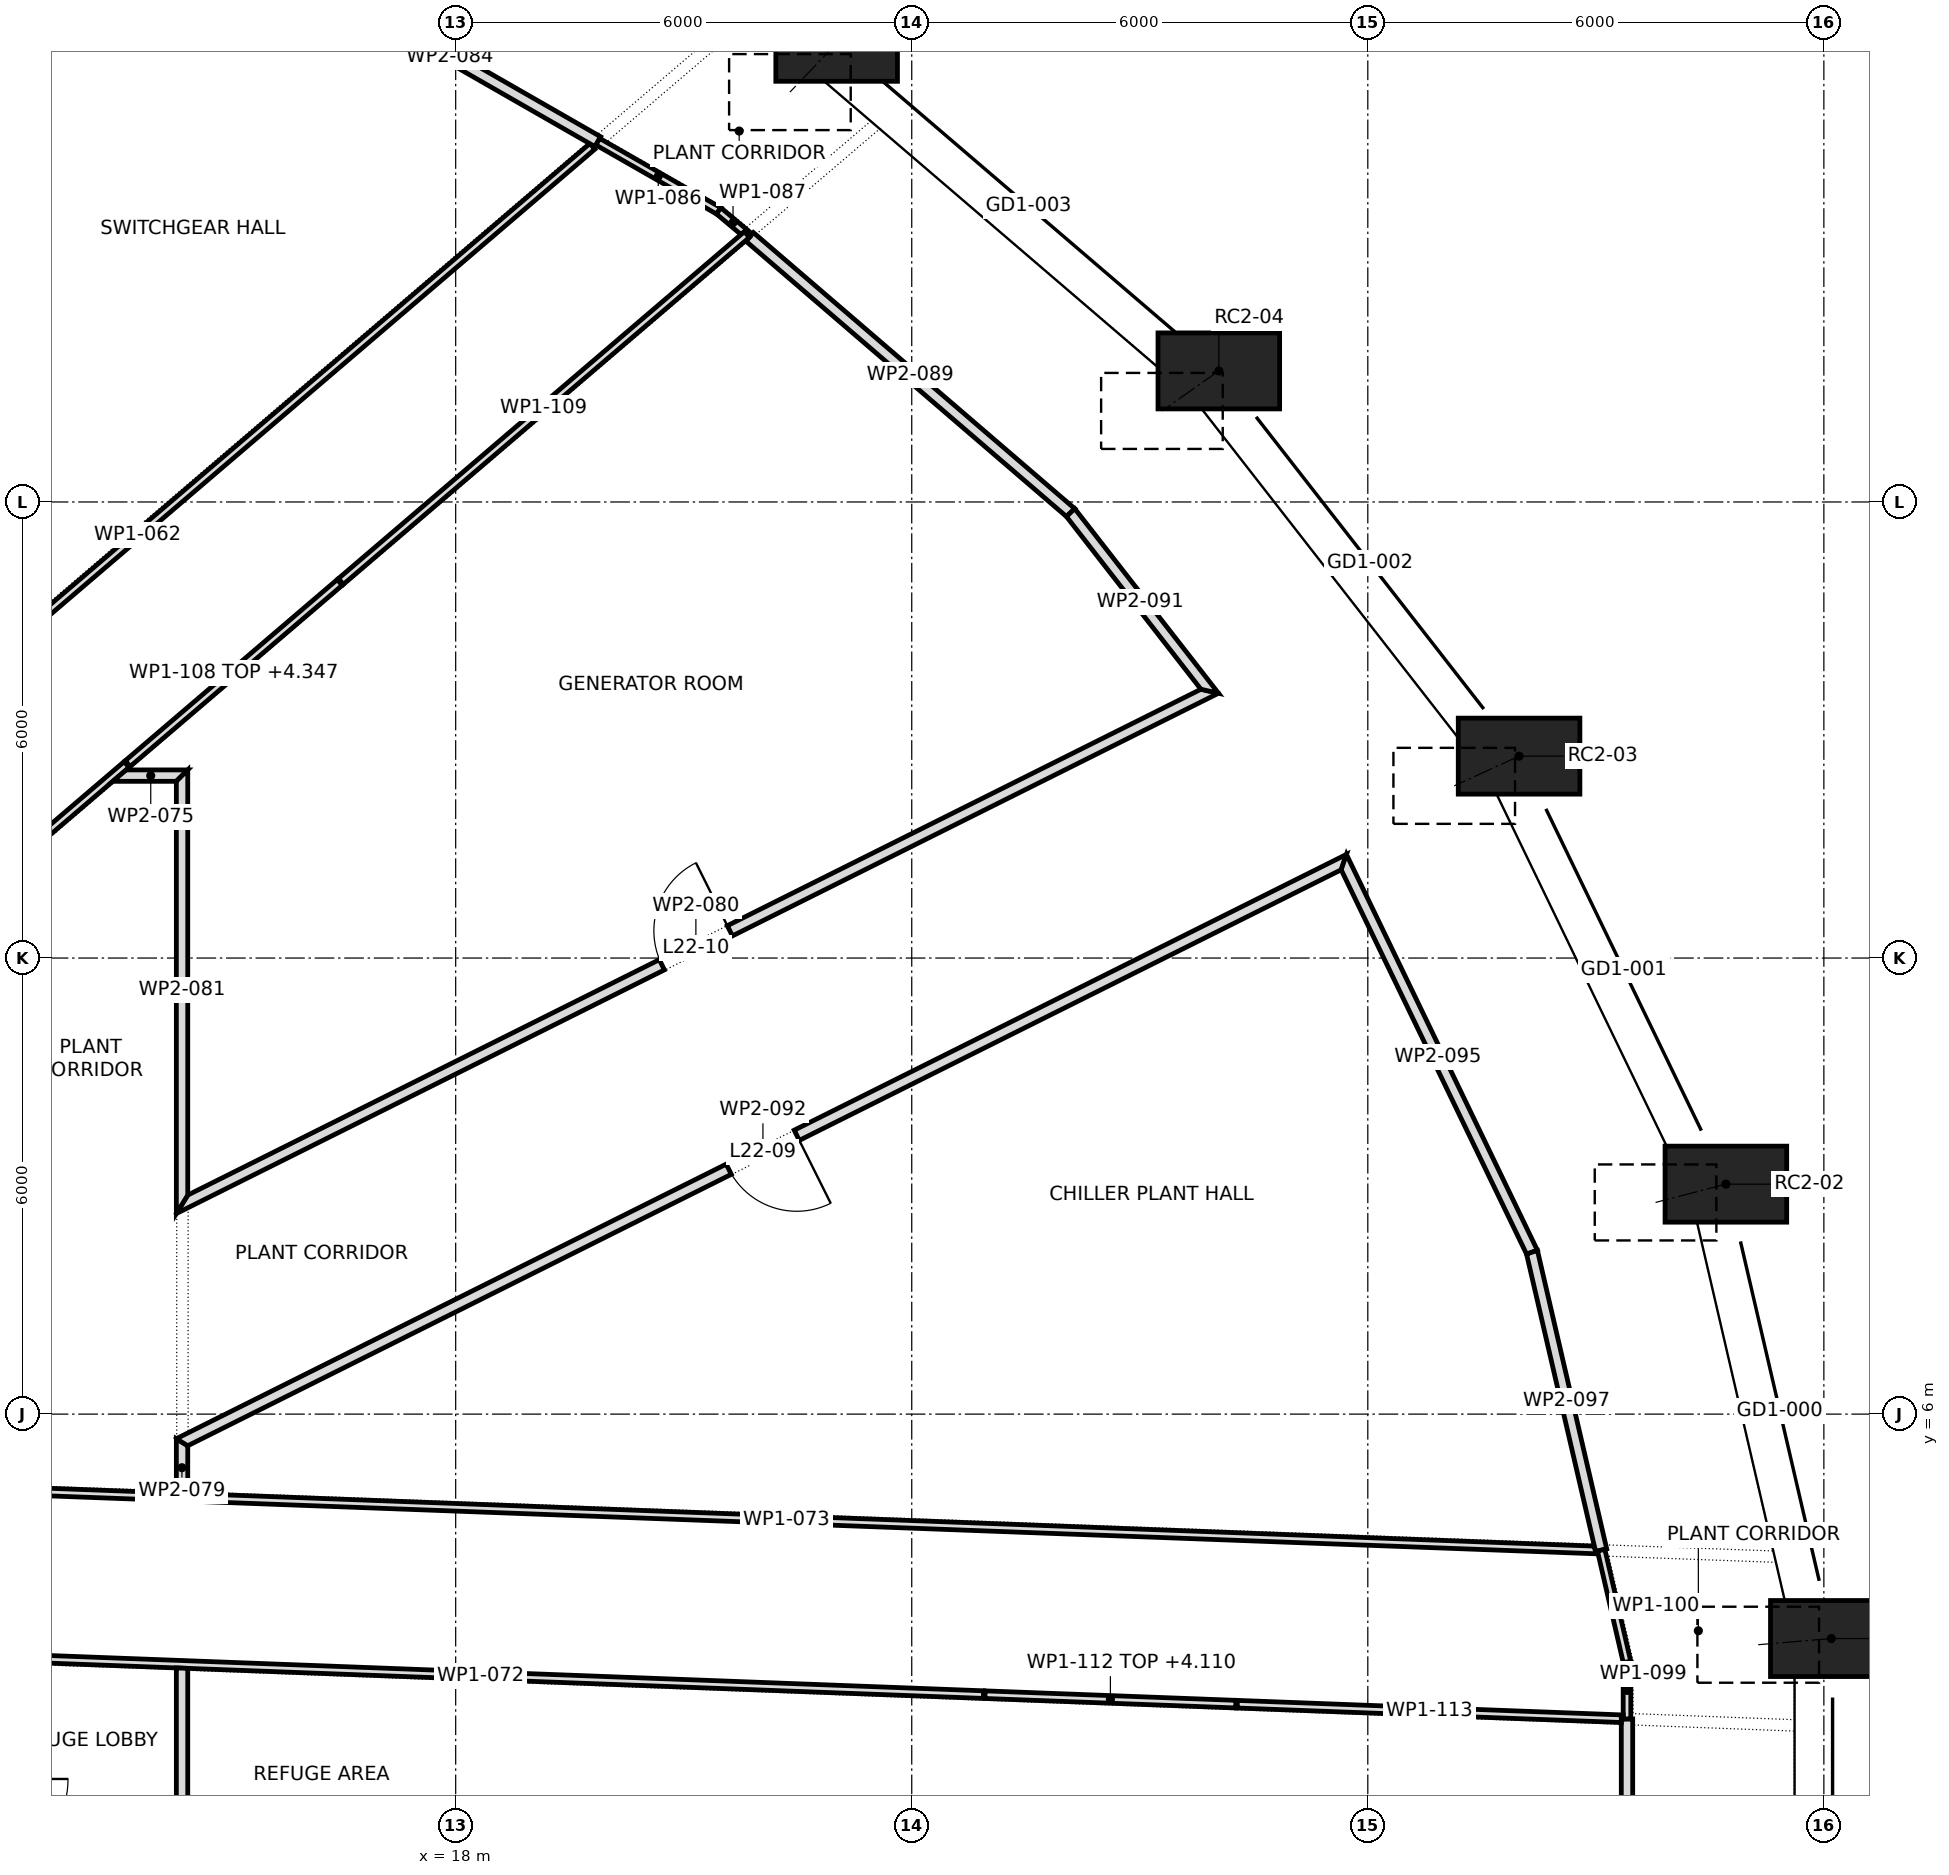
"""IFC4 building model, lengths in metres.
Left out: names, types, materials, properties, quantities, classifications, styles, units other than length and angle.
Written with IfcOpenShell. Run it as: python <this file> out.ifc"""

import sys

from ifc_helpers import new_model, si_unit, direction, frame, frame_2d, origin, origin_2d, place, context, subcontext, project, spatial, polyline, rectangle, outline, extrude, element, fill, save


model = new_model("IFC4")
c1 = context("Model", 3, precision=1e-05, world=origin(), true_north=direction((0.0, 1.0)))
c2 = subcontext(c1, "Body", "Model", "MODEL_VIEW")
j1 = project(units=[si_unit("LENGTHUNIT", "METRE"), si_unit("PLANEANGLEUNIT", "RADIAN")], contexts=[c1])
p1 = place(None, origin())
s1 = spatial("IfcSite", under=j1, at=p1, CompositionType="ELEMENT")
p2 = place(p1, origin())
s2 = spatial("IfcBuilding", under=s1, at=p2, CompositionType="ELEMENT")
p3 = place(p2, frame((0.0, 0.0, 99.1)))
s3 = spatial("IfcBuildingStorey", under=s2, at=p3, CompositionType="ELEMENT", Elevation=99.1)
p4 = place(p3, frame((36.098, 3.048, 0.091), z_axis=(-0.181244204702, -0.015318355372, 0.983318812111), x_axis=(0.08421750827, -0.99644739515, 0.0)))
e1 = element("IfcColumn", 1, at=p4, inside=s3, PredefinedType="COLUMN", context=c2, shape_type="SweptSolid", body=[
    extrude(rectangle(XDim=1.6, YDim=1.0, at=origin_2d()), origin(), (0.0, 0.0, 1.0), 5.307),
])
p5 = place(p3, frame((34.711, 9.025, 0.09), z_axis=(-0.174299234712, -0.045357362213, 0.983647541791), x_axis=(0.251839594723, -0.967768990271, 0.0)))
e2 = element("IfcColumn", 2, at=p5, inside=s3, PredefinedType="COLUMN", context=c2, shape_type="SweptSolid", body=[
    extrude(rectangle(XDim=1.6, YDim=1.0, at=origin_2d()), origin(), (0.0, 0.0, 1.0), 5.307),
])
p6 = place(p3, frame((31.99, 14.656, 0.088), z_axis=(-0.160721780276, -0.073644982891, 0.984248406572), x_axis=(0.416565116305, -0.909105881555, 0.0)))
e3 = element("IfcColumn", 3, at=p6, inside=s3, PredefinedType="COLUMN", context=c2, shape_type="SweptSolid", body=[
    extrude(rectangle(XDim=1.6, YDim=1.0, at=origin_2d()), origin(), (0.0, 0.0, 1.0), 5.307),
])
p7 = place(p3, frame((28.04, 19.724, 0.086), z_axis=(-0.140981797412, -0.099170230088, 0.985032688931), x_axis=(0.575341361803, -0.817913392358, 0.0)))
e4 = element("IfcColumn", 4, at=p7, inside=s3, PredefinedType="COLUMN", context=c2, shape_type="SweptSolid", body=[
    extrude(rectangle(XDim=1.6, YDim=1.0, at=origin_2d()), origin(), (0.0, 0.0, 1.0), 5.308),
])
p8 = place(p3, frame((23.012, 24.034, 0.083), z_axis=(-0.115812481815, -0.12096379157, 0.985877898213), x_axis=(0.722319686129, -0.691559304059, 0.0)))
e5 = element("IfcColumn", 5, at=p8, inside=s3, PredefinedType="COLUMN", context=c2, shape_type="SweptSolid", body=[
    extrude(rectangle(XDim=1.6, YDim=1.0, at=origin_2d()), origin(), (0.0, 0.0, 1.0), 5.308),
])
p9 = place(p3, frame((7.792, 12.417, 0.0), z_axis=(0.0, 0.0, 1.0), x_axis=(0.76019424358, 0.649695861175, 0.0)))
e6 = element("IfcWall", 6, at=p9, inside=s3, PredefinedType="PARTITIONING", context=c2, shape_type="SweptSolid", body=[
    extrude(outline(polyline([(15.793, 0.05), (13.819, 0.05), (11.845, 0.05), (9.871, 0.05), (7.897, 0.05), (5.922, 0.05), (3.948, 0.05), (1.974, 0.05), (0.0, 0.05), (0.1, -0.05), (2.062, -0.05), (4.023, -0.05), (5.985, -0.05), (7.947, -0.05), (9.908, -0.05), (11.87, -0.05), (13.832, -0.05), (15.793, -0.05), (15.793, 0.05)])), origin(), (0.0, 0.0, 1.0), 5.1),
])
p10 = place(p3, frame((10.34, 11.7, 0.0), z_axis=(0.0, 0.0, 1.0), x_axis=(0.760272395003, 0.649604406848, 0.0)))
e7 = element("IfcWall", 7, at=p10, inside=s3, PredefinedType="PARTITIONING", context=c2, shape_type="SweptSolid", body=[
    extrude(rectangle(XDim=4.39, YDim=0.1, at=frame_2d((2.195, 0.0))), origin(), (0.0, 0.0, 1.0), 5.1),
])
p11 = place(p3, frame((11.7, 2.81, 0.0), z_axis=(0.0, 0.0, 1.0), x_axis=(0.999287125547, -0.037752360414, 0.0)))
e8 = element("IfcWall", 8, at=p11, inside=s3, PredefinedType="PARTITIONING", context=c2, shape_type="SweptSolid", body=[
    extrude(outline(polyline([(0.0, 0.05), (0.0, -0.05), (1.895, -0.05), (3.79, -0.05), (5.684, -0.05), (7.579, -0.05), (9.474, -0.05), (11.369, -0.05), (13.264, -0.05), (13.264, 0.05), (11.369, 0.05), (9.474, 0.05), (7.579, 0.05), (5.684, 0.05), (3.79, 0.05), (1.895, 0.05), (0.0, 0.05)])), origin(), (0.0, 0.0, 1.0), 5.1),
])
p12 = place(p3, frame((11.7, 5.01, 0.0), z_axis=(0.0, 0.0, 1.0), x_axis=(0.999299980001, -0.037410559601, 0.0)))
e9 = element("IfcWall", 9, at=p12, inside=s3, PredefinedType="PARTITIONING", context=c2, shape_type="SweptSolid", body=[
    extrude(outline(polyline([(21.346, -0.05), (21.346, -0.049), (21.337, -0.013), (21.312, -0.02), (21.294, 0.05), (19.358, 0.05), (17.422, 0.05), (15.486, 0.05), (13.551, 0.05), (11.615, 0.05), (9.679, 0.05), (7.743, 0.05), (5.807, 0.05), (3.872, 0.05), (1.936, 0.05), (0.0, 0.05), (0.0, -0.05), (1.941, -0.05), (3.881, -0.05), (5.822, -0.05), (7.762, -0.05), (9.703, -0.05), (11.644, -0.05), (13.584, -0.05), (15.525, -0.05), (17.465, -0.05), (19.406, -0.05), (21.346, -0.05)])), origin(), (0.0, 0.0, 1.0), 5.1),
])
p13 = place(p3, frame((13.488, 14.4, 0.0), z_axis=(0.0, 0.0, 1.0), x_axis=(1.0, 0.0, 0.0)))
e10 = element("IfcWall", 10, at=p13, inside=s3, PredefinedType="PARTITIONING", context=c2, shape_type="SweptSolid", body=[
    extrude(outline(polyline([(0.001, -0.075), (0.837, -0.075), (0.837, -0.075), (0.987, 0.075), (0.177, 0.075), (0.001, -0.075)])), origin(), (0.0, 0.0, 1.0), 5.1),
])
p14 = place(p3, frame((14.4, 2.66, 0.0), z_axis=(0.0, 0.0, 1.0), x_axis=(0.0, -1.0, 0.0)))
e11 = element("IfcWall", 11, at=p14, inside=s3, PredefinedType="PARTITIONING", context=c2, shape_type="SweptSolid", body=[
    extrude(outline(polyline([(5.128, -0.075), (5.128, -0.075), (5.128, -0.075), (5.128, -0.075), (5.07, 0.0), (5.013, 0.075), (3.344, 0.075), (1.675, 0.075), (0.005, 0.075), (0.0, -0.064), (0.0, -0.075), (1.709, -0.075), (3.419, -0.075), (5.128, -0.075)])), origin(), (0.0, 0.0, 1.0), 5.1),
])
p15 = place(p3, frame((14.4, 5.677, 0.0), z_axis=(0.0, 0.0, 1.0), x_axis=(0.0, -1.0, 0.0)))
e12 = element("IfcWall", 12, at=p15, inside=s3, PredefinedType="PARTITIONING", context=c2, shape_type="SweptSolid", body=[
    extrude(outline(polyline([(0.0, -0.075), (0.715, -0.075), (0.72, 0.065), (0.72, 0.075), (0.093, 0.075), (0.047, 0.0), (0.0, -0.075)])), origin(), (0.0, 0.0, 1.0), 5.1),
])
p16 = place(p3, frame((14.292, 8.706, 0.0), z_axis=(0.0, 0.0, 1.0), x_axis=(0.894694684053, 0.446678208925, 0.0)))
e13 = element("IfcWall", 13, at=p16, inside=s3, PredefinedType="PARTITIONING", context=c2, shape_type="SweptSolid", body=[
    extrude(outline(polyline([(15.324, -0.075), (15.324, -0.075), (15.141, 0.075), (13.279, 0.075), (11.417, 0.075), (9.554, 0.075), (7.692, 0.075), (5.83, 0.075), (3.967, 0.075), (2.105, 0.075), (0.242, 0.075), (0.0, -0.075), (1.916, -0.075), (3.831, -0.075), (5.747, -0.075), (7.662, -0.075), (9.578, -0.075), (11.493, -0.075), (13.409, -0.075), (15.324, -0.075)])), origin(), (0.0, 0.0, 1.0), 5.1),
])
p17 = place(p16, frame((7.177, 0.0, 0.0)))
e14 = element("IfcOpeningElement", 14, at=p17, cuts=e13, PredefinedType="OPENING", context=c2, shape_type="SweptSolid", body=[
    extrude(rectangle(XDim=1.0, YDim=2.1, at=frame_2d((0.5, 1.05))), frame((0.0, 0.087, 0.0), z_axis=(0.0, -1.0, 0.0), x_axis=(1.0, 0.0, 0.0)), (0.0, 0.0, 1.0), 0.174),
])
p18 = place(p3, frame((14.4, 14.475, 0.0), z_axis=(0.0, 0.0, 1.0), x_axis=(0.0, -1.0, 0.0)))
e15 = element("IfcWall", 15, at=p18, inside=s3, PredefinedType="PARTITIONING", context=c2, shape_type="SweptSolid", body=[
    extrude(outline(polyline([(5.836, -0.075), (5.836, -0.075), (5.594, 0.075), (3.729, 0.075), (1.865, 0.075), (0.0, 0.075), (0.15, -0.075), (2.046, -0.075), (3.941, -0.075), (5.836, -0.075)])), origin(), (0.0, 0.0, 1.0), 5.1),
])
p19 = place(p3, frame((19.87, 22.74, 0.0), z_axis=(0.0, 0.0, 1.0), x_axis=(-0.867559828307, 0.497332830515, 0.0)))
e16 = element("IfcWall", 16, at=p19, inside=s3, PredefinedType="PARTITIONING", context=c2, shape_type="SweptSolid", body=[
    extrude(outline(polyline([(4.491, -0.075), (4.491, -0.075), (4.477, 0.075), (2.985, 0.075), (1.492, 0.075), (0.0, 0.075), (0.0, -0.075), (1.497, -0.075), (2.994, -0.075), (4.491, -0.075)])), origin(), (0.0, 0.0, 1.0), 5.1),
])
p20 = place(p3, frame((21.464, 21.828, 0.0), z_axis=(0.0, 0.0, 1.0), x_axis=(-0.867915684875, 0.496711550045, 0.0)))
e17 = element("IfcWall", 17, at=p20, inside=s3, PredefinedType="PARTITIONING", context=c2, shape_type="SweptSolid", body=[
    extrude(outline(polyline([(1.836, 0.05), (0.009, 0.05), (0.0, -0.049), (0.0, -0.05), (1.836, -0.05), (1.836, 0.05)])), origin(), (0.0, 0.0, 1.0), 5.1),
])
p21 = place(p3, frame((21.869, 21.488, 0.0), z_axis=(0.0, 0.0, 1.0), x_axis=(-0.766357366052, 0.642414498201, 0.0)))
e18 = element("IfcWall", 18, at=p21, inside=s3, PredefinedType="PARTITIONING", context=c2, shape_type="SweptSolid", body=[
    extrude(outline(polyline([(0.0, -0.05), (0.538, -0.05), (0.533, 0.0), (0.529, 0.05), (0.108, 0.05), (0.098, -0.008), (0.0, 0.008), (0.0, -0.037), (0.0, -0.05)])), origin(), (0.0, 0.0, 1.0), 5.1),
])
p22 = place(p3, frame((26.096, 17.855, 0.0), z_axis=(0.0, 0.0, 1.0), x_axis=(-0.758501684647, 0.651671078373, 0.0)))
e19 = element("IfcWall", 19, at=p22, inside=s3, PredefinedType="PARTITIONING", context=c2, shape_type="SweptSolid", body=[
    extrude(outline(polyline([(5.574, 0.075), (3.721, 0.075), (1.868, 0.075), (0.015, 0.075), (0.0, -0.075), (1.858, -0.075), (3.716, -0.075), (5.574, -0.075), (5.574, 0.075)])), origin(), (0.0, 0.0, 1.0), 5.1),
])
p23 = place(p3, frame((27.976, 15.438, 0.0), z_axis=(0.0, 0.0, 1.0), x_axis=(-0.614396342768, 0.788997550055, 0.0)))
e20 = element("IfcWall", 20, at=p23, inside=s3, PredefinedType="PARTITIONING", context=c2, shape_type="SweptSolid", body=[
    extrude(outline(polyline([(0.0, -0.075), (1.539, -0.075), (3.078, -0.075), (3.062, 0.075), (1.623, 0.075), (0.183, 0.075), (0.0, -0.075)])), origin(), (0.0, 0.0, 1.0), 5.1),
])
p24 = place(p3, frame((29.752, 13.296, 0.0), z_axis=(0.0, 0.0, 1.0), x_axis=(-0.894665437073, -0.446736785711, 0.0)))
e21 = element("IfcWall", 21, at=p24, inside=s3, PredefinedType="PARTITIONING", context=c2, shape_type="SweptSolid", body=[
    extrude(outline(polyline([(0.0, -0.075), (1.912, -0.075), (3.824, -0.075), (5.736, -0.075), (7.647, -0.075), (9.559, -0.075), (11.471, -0.075), (13.383, -0.075), (15.295, -0.075), (17.207, -0.075), (17.114, 0.075), (15.229, 0.075), (13.344, 0.075), (11.46, 0.075), (9.575, 0.075), (7.691, 0.075), (5.806, 0.075), (3.921, 0.075), (2.037, 0.075), (0.152, 0.075), (0.0, -0.075)])), origin(), (0.0, 0.0, 1.0), 5.1),
])
p25 = place(p24, frame((8.121, 0.0, 0.0)))
e22 = element("IfcOpeningElement", 22, at=p25, cuts=e21, PredefinedType="OPENING", context=c2, shape_type="SweptSolid", body=[
    extrude(rectangle(XDim=1.0, YDim=2.1, at=frame_2d((0.5, 1.05))), frame((0.0, 0.087, 0.0), z_axis=(0.0, -1.0, 0.0), x_axis=(1.0, 0.0, 0.0)), (0.0, 0.0, 1.0), 0.174),
])
p26 = place(p3, frame((32.164, 8.123, 0.0), z_axis=(0.0, 0.0, 1.0), x_axis=(-0.434451501861, 0.900695227328, 0.0)))
e23 = element("IfcWall", 23, at=p26, inside=s3, PredefinedType="PARTITIONING", context=c2, shape_type="SweptSolid", body=[
    extrude(outline(polyline([(0.0, -0.075), (1.927, -0.075), (3.855, -0.075), (5.782, -0.075), (5.63, 0.075), (3.759, 0.075), (1.888, 0.075), (0.017, 0.075), (0.0, -0.074), (0.0, -0.075)])), origin(), (0.0, 0.0, 1.0), 5.1),
])
p27 = place(p3, frame((33.07, 4.21, 0.0), z_axis=(0.0, 0.0, 1.0), x_axis=(-0.226119449159, 0.974099581517, 0.0)))
e24 = element("IfcWall", 24, at=p27, inside=s3, PredefinedType="PARTITIONING", context=c2, shape_type="SweptSolid", body=[
    extrude(outline(polyline([(0.0, -0.075), (1.344, -0.075), (2.688, -0.075), (4.033, -0.075), (4.016, 0.075), (2.677, 0.075), (1.339, 0.075), (0.0, 0.075), (0.0, -0.075)])), origin(), (0.0, 0.0, 1.0), 5.1),
])
p28 = place(p3, frame((33.41, -2.749, 0.0), z_axis=(0.0, 0.0, 1.0), x_axis=(0.0, 1.0, 0.0)))
e25 = element("IfcWall", 25, at=p28, inside=s3, PredefinedType="PARTITIONING", context=c2, shape_type="SweptSolid", body=[
    extrude(outline(polyline([(4.739, 0.075), (3.165, 0.075), (1.591, 0.075), (0.017, 0.075), (0.0, -0.075), (0.0, -0.075), (1.58, -0.075), (3.159, -0.075), (4.739, -0.075), (4.739, 0.075)])), origin(), (0.0, 0.0, 1.0), 5.1),
])
p29 = place(p3, frame((33.41, 1.99, 0.0), z_axis=(0.0, 0.0, 1.0), x_axis=(0.0, 1.0, 0.0)))
e26 = element("IfcWall", 26, at=p29, inside=s3, PredefinedType="PARTITIONING", context=c2, shape_type="SweptSolid", body=[
    extrude(outline(polyline([(0.756, -0.05), (0.756, -0.049), (0.744, 0.05), (0.0, 0.05), (0.0, -0.05), (0.756, -0.05)])), origin(), (0.0, 0.0, 1.0), 5.1),
])
p30 = place(p3, frame((33.411, 2.734, 0.0), z_axis=(0.0, 0.0, 1.0), x_axis=(-0.225353937126, 0.974276964226, 0.0)))
e27 = element("IfcWall", 27, at=p30, inside=s3, PredefinedType="PARTITIONING", context=c2, shape_type="SweptSolid", body=[
    extrude(outline(polyline([(1.515, 0.05), (0.011, 0.05), (0.0, -0.05), (1.515, -0.05), (1.515, 0.05)])), origin(), (0.0, 0.0, 1.0), 5.1),
])
p31 = place(p3, frame((13.678, 14.552, 0.0), z_axis=(0.0, 0.0, 1.0), x_axis=(0.760241551137, 0.649640503605, 0.0)))
e28 = element("IfcWall", 28, at=p31, inside=s3, PredefinedType="PARTITIONING", context=c2, shape_type="SweptSolid", body=[
    extrude(rectangle(XDim=3.688, YDim=0.1, at=frame_2d((1.844, 0.0))), origin(), (0.0, 0.0, 1.0), 4.347),
])
p32 = place(p3, frame((16.482, 16.948, 0.0), z_axis=(0.0, 0.0, 1.0), x_axis=(0.760281921653, 0.649593257052, 0.0)))
e29 = element("IfcWall", 29, at=p32, inside=s3, PredefinedType="PARTITIONING", context=c2, shape_type="SweptSolid", body=[
    extrude(rectangle(XDim=7.036, YDim=0.1, at=frame_2d((3.518, 0.0))), origin(), (0.0, 0.0, 1.0), 5.1),
])
p33 = place(p3, frame((24.954, 2.309, 0.0), z_axis=(0.0, 0.0, 1.0), x_axis=(0.999288814616, -0.037707625002, 0.0)))
e30 = element("IfcWall", 30, at=p33, inside=s3, PredefinedType="PARTITIONING", context=c2, shape_type="SweptSolid", body=[
    extrude(outline(polyline([(0.0, 0.05), (0.0, -0.05), (1.661, -0.05), (3.322, -0.05), (3.322, 0.05), (1.661, 0.05), (0.0, 0.05)])), origin(), (0.0, 0.0, 1.0), 4.11),
])
p34 = place(p3, frame((28.273, 2.184, 0.0), z_axis=(0.0, 0.0, 1.0), x_axis=(0.99928681657, -0.037760537986, 0.0)))
e31 = element("IfcWall", 31, at=p34, inside=s3, PredefinedType="PARTITIONING", context=c2, shape_type="SweptSolid", body=[
    extrude(outline(polyline([(0.0, -0.05), (1.689, -0.05), (3.378, -0.05), (5.067, -0.05), (5.065, -0.003), (5.088, -0.002), (5.088, 0.05), (3.392, 0.05), (1.696, 0.05), (0.0, 0.05), (0.0, -0.05)])), origin(), (0.0, 0.0, 1.0), 5.1),
])
p35 = place(p25, origin())
e32 = element("IfcDoor", 32, at=p35, inside=s3, OperationType="SINGLE_SWING_RIGHT", PredefinedType="DOOR", context=c2, shape_type="SweptSolid", body=[
    extrude(rectangle(XDim=1.0, YDim=2.1, at=frame_2d((0.5, 1.05))), frame((0.0, 0.025, 0.0), z_axis=(0.0, -1.0, 0.0), x_axis=(1.0, 0.0, 0.0)), (0.0, 0.0, 1.0), 0.05),
])
fill(e22, e32)
p36 = place(p17, origin())
e33 = element("IfcDoor", 33, at=p36, inside=s3, OperationType="SINGLE_SWING_LEFT", PredefinedType="DOOR", context=c2, shape_type="SweptSolid", body=[
    extrude(rectangle(XDim=1.0, YDim=2.1, at=frame_2d((0.5, 1.05))), frame((0.0, 0.025, 0.0), z_axis=(0.0, -1.0, 0.0), x_axis=(1.0, 0.0, 0.0)), (0.0, 0.0, 1.0), 0.05),
])
fill(e14, e33)
save(model, sys.argv[1])
